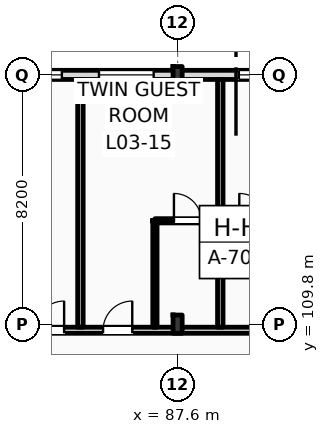
"""IFC4 building model, lengths in metres.
Left out: names, types, materials, properties, quantities, classifications, styles, units other than length and angle.
Written with IfcOpenShell. Run it as: python <this file> out.ifc"""

import sys

from ifc_helpers import new_model, si_unit, direction, frame, frame_2d, origin, origin_2d, place, context, subcontext, project, spatial, rectangle, i_section, extrude, element, fill, save


model = new_model("IFC4")
c1 = context("Model", 3, precision=1e-05, world=origin(), true_north=direction((0.0, 1.0)))
c2 = subcontext(c1, "Body", "Model", "MODEL_VIEW")
j1 = project(units=[si_unit("LENGTHUNIT", "METRE"), si_unit("PLANEANGLEUNIT", "RADIAN")], contexts=[c1])
p1 = place(None, origin())
s1 = spatial("IfcSite", under=j1, at=p1, CompositionType="ELEMENT")
p2 = place(p1, origin())
s2 = spatial("IfcBuilding", under=s1, at=p2, CompositionType="ELEMENT")
p3 = place(p2, frame((0.0, 0.0, 16.2)))
s3 = spatial("IfcBuildingStorey", under=s2, at=p3, CompositionType="ELEMENT", Elevation=16.2)
p4 = place(p3, frame((87.6, 109.8, 0.0), z_axis=(0.0, 0.0, 1.0), x_axis=(1.0, 0.0, 0.0)))
e1 = element("IfcColumn", 1, at=p4, inside=s3, PredefinedType="COLUMN", context=c2, shape_type="SweptSolid", body=[
    extrude(i_section(OverallWidth=0.3, OverallDepth=0.6, WebThickness=0.015, FlangeThickness=0.03, FilletRadius=0.027, at=origin_2d()), origin(), (0.0, 0.0, 1.0), 4.2),
])
p5 = place(p3, frame((87.6, 118.0, 0.0), z_axis=(0.0, 0.0, 1.0), x_axis=(1.0, 0.0, 0.0)))
e2 = element("IfcColumn", 2, at=p5, inside=s3, PredefinedType="COLUMN", context=c2, shape_type="SweptSolid", body=[
    extrude(i_section(OverallWidth=0.3, OverallDepth=0.55, WebThickness=0.015, FlangeThickness=0.029, FilletRadius=0.027, at=origin_2d()), origin(), (0.0, 0.0, 1.0), 4.2),
])
p6 = place(p3, frame((22.5, 118.0, 0.0), z_axis=(0.0, 0.0, 1.0), x_axis=(1.0, 0.0, 0.0)))
e3 = element("IfcWall", 3, at=p6, inside=s3, PredefinedType="STANDARD", context=c2, shape_type="SweptSolid", body=[
    extrude(rectangle(XDim=97.5, YDim=0.3, at=frame_2d((48.75, 0.0))), origin(), (0.0, 0.0, 1.0), 3.36),
])
p7 = place(p6, frame((3.721, 0.0, 0.9)))
e4 = element("IfcOpeningElement", 4, at=p7, cuts=e3, PredefinedType="OPENING", context=c2, shape_type="SweptSolid", body=[
    extrude(rectangle(XDim=0.9, YDim=1.8, at=frame_2d((0.45, 0.9))), frame((0.0, 0.16, 0.0), z_axis=(0.0, -1.0, 0.0), x_axis=(1.0, 0.0, 0.0)), (0.0, 0.0, 1.0), 0.32),
])
p8 = place(p6, frame((6.447, 0.0, 0.9)))
e5 = element("IfcOpeningElement", 5, at=p8, cuts=e3, PredefinedType="OPENING", context=c2, shape_type="SweptSolid", body=[
    extrude(rectangle(XDim=1.35, YDim=1.85, at=frame_2d((0.675, 0.925))), frame((0.0, 0.16, 0.0), z_axis=(0.0, -1.0, 0.0), x_axis=(1.0, 0.0, 0.0)), (0.0, 0.0, 1.0), 0.32),
])
p9 = place(p6, frame((11.363, 0.0, 0.9)))
e6 = element("IfcOpeningElement", 6, at=p9, cuts=e3, PredefinedType="OPENING", context=c2, shape_type="SweptSolid", body=[
    extrude(rectangle(XDim=1.5, YDim=1.9, at=frame_2d((0.75, 0.95))), frame((0.0, 0.16, 0.0), z_axis=(0.0, -1.0, 0.0), x_axis=(1.0, 0.0, 0.0)), (0.0, 0.0, 1.0), 0.32),
])
p10 = place(p6, frame((15.078, 0.0, 0.9)))
e7 = element("IfcOpeningElement", 7, at=p10, cuts=e3, PredefinedType="OPENING", context=c2, shape_type="SweptSolid", body=[
    extrude(rectangle(XDim=1.65, YDim=1.95, at=frame_2d((0.825, 0.975))), frame((0.0, 0.16, 0.0), z_axis=(0.0, -1.0, 0.0), x_axis=(1.0, 0.0, 0.0)), (0.0, 0.0, 1.0), 0.32),
])
p11 = place(p6, frame((19.395, 0.0, 0.9)))
e8 = element("IfcOpeningElement", 8, at=p11, cuts=e3, PredefinedType="OPENING", context=c2, shape_type="SweptSolid", body=[
    extrude(rectangle(XDim=1.8, YDim=2.0, at=frame_2d((0.9, 1.0))), frame((0.0, 0.16, 0.0), z_axis=(0.0, -1.0, 0.0), x_axis=(1.0, 0.0, 0.0)), (0.0, 0.0, 1.0), 0.32),
])
p12 = place(p6, frame((23.31, 0.0, 0.9)))
e9 = element("IfcOpeningElement", 9, at=p12, cuts=e3, PredefinedType="OPENING", context=c2, shape_type="SweptSolid", body=[
    extrude(rectangle(XDim=1.95, YDim=2.05, at=frame_2d((0.975, 1.025))), frame((0.0, 0.16, 0.0), z_axis=(0.0, -1.0, 0.0), x_axis=(1.0, 0.0, 0.0)), (0.0, 0.0, 1.0), 0.32),
])
p13 = place(p6, frame((28.026, 0.0, 0.9)))
e10 = element("IfcOpeningElement", 10, at=p13, cuts=e3, PredefinedType="OPENING", context=c2, shape_type="SweptSolid", body=[
    extrude(rectangle(XDim=2.1, YDim=2.1, at=frame_2d((1.05, 1.05))), frame((0.0, 0.16, 0.0), z_axis=(0.0, -1.0, 0.0), x_axis=(1.0, 0.0, 0.0)), (0.0, 0.0, 1.0), 0.32),
])
p14 = place(p6, frame((31.941, 0.0, 0.9)))
e11 = element("IfcOpeningElement", 11, at=p14, cuts=e3, PredefinedType="OPENING", context=c2, shape_type="SweptSolid", body=[
    extrude(rectangle(XDim=1.1, YDim=2.15, at=frame_2d((0.55, 1.075))), frame((0.0, 0.16, 0.0), z_axis=(0.0, -1.0, 0.0), x_axis=(1.0, 0.0, 0.0)), (0.0, 0.0, 1.0), 0.32),
])
p15 = place(p6, frame((36.657, 0.0, 0.9)))
e12 = element("IfcOpeningElement", 12, at=p15, cuts=e3, PredefinedType="OPENING", context=c2, shape_type="SweptSolid", body=[
    extrude(rectangle(XDim=2.4, YDim=2.2, at=frame_2d((1.2, 1.1))), frame((0.0, 0.16, 0.0), z_axis=(0.0, -1.0, 0.0), x_axis=(1.0, 0.0, 0.0)), (0.0, 0.0, 1.0), 0.32),
])
p16 = place(p6, frame((42.574, 0.0, 0.9)))
e13 = element("IfcOpeningElement", 13, at=p16, cuts=e3, PredefinedType="OPENING", context=c2, shape_type="SweptSolid", body=[
    extrude(rectangle(XDim=1.35, YDim=2.25, at=frame_2d((0.675, 1.125))), frame((0.0, 0.16, 0.0), z_axis=(0.0, -1.0, 0.0), x_axis=(1.0, 0.0, 0.0)), (0.0, 0.0, 1.0), 0.32),
])
p17 = place(p6, frame((45.289, 0.0, 0.9)))
e14 = element("IfcOpeningElement", 14, at=p17, cuts=e3, PredefinedType="OPENING", context=c2, shape_type="SweptSolid", body=[
    extrude(rectangle(XDim=2.7, YDim=2.28, at=frame_2d((1.35, 1.14))), frame((0.0, 0.16, 0.0), z_axis=(0.0, -1.0, 0.0), x_axis=(1.0, 0.0, 0.0)), (0.0, 0.0, 1.0), 0.32),
])
p18 = place(p6, frame((50.406, 0.0, 0.9)))
e15 = element("IfcOpeningElement", 15, at=p18, cuts=e3, PredefinedType="OPENING", context=c2, shape_type="SweptSolid", body=[
    extrude(rectangle(XDim=1.8, YDim=2.28, at=frame_2d((0.9, 1.14))), frame((0.0, 0.16, 0.0), z_axis=(0.0, -1.0, 0.0), x_axis=(1.0, 0.0, 0.0)), (0.0, 0.0, 1.0), 0.32),
])
p19 = place(p6, frame((53.922, 0.0, 0.9)))
e16 = element("IfcOpeningElement", 16, at=p19, cuts=e3, PredefinedType="OPENING", context=c2, shape_type="SweptSolid", body=[
    extrude(rectangle(XDim=1.8, YDim=2.28, at=frame_2d((0.9, 1.14))), frame((0.0, 0.16, 0.0), z_axis=(0.0, -1.0, 0.0), x_axis=(1.0, 0.0, 0.0)), (0.0, 0.0, 1.0), 0.32),
])
p20 = place(p6, frame((58.332, 0.0, 0.9)))
e17 = element("IfcOpeningElement", 17, at=p20, cuts=e3, PredefinedType="OPENING", context=c2, shape_type="SweptSolid", body=[
    extrude(rectangle(XDim=2.961, YDim=2.28, at=frame_2d((1.48, 1.14))), frame((0.0, 0.16, 0.0), z_axis=(0.0, -1.0, 0.0), x_axis=(1.0, 0.0, 0.0)), (0.0, 0.0, 1.0), 0.32),
])
p21 = place(p6, frame((62.513, 0.0, 0.9)))
e18 = element("IfcOpeningElement", 18, at=p21, cuts=e3, PredefinedType="OPENING", context=c2, shape_type="SweptSolid", body=[
    extrude(rectangle(XDim=1.8, YDim=2.28, at=frame_2d((0.9, 1.14))), frame((0.0, 0.16, 0.0), z_axis=(0.0, -1.0, 0.0), x_axis=(1.0, 0.0, 0.0)), (0.0, 0.0, 1.0), 0.32),
])
p22 = place(p6, frame((67.114, 0.0, 0.9)))
e19 = element("IfcOpeningElement", 19, at=p22, cuts=e3, PredefinedType="OPENING", context=c2, shape_type="SweptSolid", body=[
    extrude(rectangle(XDim=2.961, YDim=2.28, at=frame_2d((1.48, 1.14))), frame((0.0, 0.16, 0.0), z_axis=(0.0, -1.0, 0.0), x_axis=(1.0, 0.0, 0.0)), (0.0, 0.0, 1.0), 0.32),
])
p23 = place(p6, frame((73.695, 0.0, 0.9)))
e20 = element("IfcOpeningElement", 20, at=p23, cuts=e3, PredefinedType="OPENING", context=c2, shape_type="SweptSolid", body=[
    extrude(rectangle(XDim=1.1, YDim=2.28, at=frame_2d((0.55, 1.14))), frame((0.0, 0.16, 0.0), z_axis=(0.0, -1.0, 0.0), x_axis=(1.0, 0.0, 0.0)), (0.0, 0.0, 1.0), 0.32),
])
p24 = place(p6, frame((75.895, 0.0, 0.9)))
e21 = element("IfcOpeningElement", 21, at=p24, cuts=e3, PredefinedType="OPENING", context=c2, shape_type="SweptSolid", body=[
    extrude(rectangle(XDim=2.961, YDim=2.28, at=frame_2d((1.48, 1.14))), frame((0.0, 0.16, 0.0), z_axis=(0.0, -1.0, 0.0), x_axis=(1.0, 0.0, 0.0)), (0.0, 0.0, 1.0), 0.32),
])
p25 = place(p6, frame((81.676, 0.0, 0.9)))
e22 = element("IfcOpeningElement", 22, at=p25, cuts=e3, PredefinedType="OPENING", context=c2, shape_type="SweptSolid", body=[
    extrude(rectangle(XDim=1.8, YDim=2.28, at=frame_2d((0.9, 1.14))), frame((0.0, 0.16, 0.0), z_axis=(0.0, -1.0, 0.0), x_axis=(1.0, 0.0, 0.0)), (0.0, 0.0, 1.0), 0.32),
])
p26 = place(p6, frame((84.677, 0.0, 0.9)))
e23 = element("IfcOpeningElement", 23, at=p26, cuts=e3, PredefinedType="OPENING", context=c2, shape_type="SweptSolid", body=[
    extrude(rectangle(XDim=2.961, YDim=2.28, at=frame_2d((1.48, 1.14))), frame((0.0, 0.16, 0.0), z_axis=(0.0, -1.0, 0.0), x_axis=(1.0, 0.0, 0.0)), (0.0, 0.0, 1.0), 0.32),
])
p27 = place(p6, frame((89.999, 0.0, 0.9)))
e24 = element("IfcOpeningElement", 24, at=p27, cuts=e3, PredefinedType="OPENING", context=c2, shape_type="SweptSolid", body=[
    extrude(rectangle(XDim=1.1, YDim=1.5, at=frame_2d((0.55, 0.75))), frame((0.0, 0.16, 0.0), z_axis=(0.0, -1.0, 0.0), x_axis=(1.0, 0.0, 0.0)), (0.0, 0.0, 1.0), 0.32),
])
p28 = place(p6, frame((94.35, 0.0, 0.9)))
e25 = element("IfcOpeningElement", 25, at=p28, cuts=e3, PredefinedType="OPENING", context=c2, shape_type="SweptSolid", body=[
    extrude(rectangle(XDim=1.25, YDim=1.6, at=frame_2d((0.625, 0.8))), frame((0.0, 0.16, 0.0), z_axis=(0.0, -1.0, 0.0), x_axis=(1.0, 0.0, 0.0)), (0.0, 0.0, 1.0), 0.32),
])
p29 = place(p3, frame((10.65, 109.6, 0.0), z_axis=(0.0, 0.0, 1.0), x_axis=(1.0, 0.0, 0.0)))
e26 = element("IfcWall", 26, at=p29, inside=s3, PredefinedType="PARTITIONING", context=c2, shape_type="SweptSolid", body=[
    extrude(rectangle(XDim=109.21, YDim=0.2, at=frame_2d((54.605, 0.0))), origin(), (0.0, 0.0, 1.0), 3.36),
])
p30 = place(p29, frame((15.43, 0.0, 0.0)))
e27 = element("IfcOpeningElement", 27, at=p30, cuts=e26, PredefinedType="OPENING", context=c2, shape_type="SweptSolid", body=[
    extrude(rectangle(XDim=1.02, YDim=2.2, at=frame_2d((0.51, 1.1))), frame((0.0, 0.11, 0.0), z_axis=(0.0, -1.0, 0.0), x_axis=(1.0, 0.0, 0.0)), (0.0, 0.0, 1.0), 0.22),
])
p31 = place(p29, frame((19.537, 0.0, 0.0)))
e28 = element("IfcOpeningElement", 28, at=p31, cuts=e26, PredefinedType="OPENING", context=c2, shape_type="SweptSolid", body=[
    extrude(rectangle(XDim=1.02, YDim=2.2, at=frame_2d((0.51, 1.1))), frame((0.0, 0.11, 0.0), z_axis=(0.0, -1.0, 0.0), x_axis=(1.0, 0.0, 0.0)), (0.0, 0.0, 1.0), 0.22),
])
p32 = place(p29, frame((23.928, 0.0, 0.0)))
e29 = element("IfcOpeningElement", 29, at=p32, cuts=e26, PredefinedType="OPENING", context=c2, shape_type="SweptSolid", body=[
    extrude(rectangle(XDim=1.02, YDim=2.2, at=frame_2d((0.51, 1.1))), frame((0.0, 0.11, 0.0), z_axis=(0.0, -1.0, 0.0), x_axis=(1.0, 0.0, 0.0)), (0.0, 0.0, 1.0), 0.22),
])
p33 = place(p29, frame((26.169, 0.0, 0.0)))
e30 = element("IfcOpeningElement", 30, at=p33, cuts=e26, PredefinedType="OPENING", context=c2, shape_type="SweptSolid", body=[
    extrude(rectangle(XDim=1.02, YDim=2.2, at=frame_2d((0.51, 1.1))), frame((0.0, 0.11, 0.0), z_axis=(0.0, -1.0, 0.0), x_axis=(1.0, 0.0, 0.0)), (0.0, 0.0, 1.0), 0.22),
])
p34 = place(p29, frame((32.739, 0.0, 0.0)))
e31 = element("IfcOpeningElement", 31, at=p34, cuts=e26, PredefinedType="OPENING", context=c2, shape_type="SweptSolid", body=[
    extrude(rectangle(XDim=0.96, YDim=2.2, at=frame_2d((0.48, 1.1))), frame((0.0, 0.11, 0.0), z_axis=(0.0, -1.0, 0.0), x_axis=(1.0, 0.0, 0.0)), (0.0, 0.0, 1.0), 0.22),
])
p35 = place(p29, frame((34.98, 0.0, 0.0)))
e32 = element("IfcOpeningElement", 32, at=p35, cuts=e26, PredefinedType="OPENING", context=c2, shape_type="SweptSolid", body=[
    extrude(rectangle(XDim=0.96, YDim=2.2, at=frame_2d((0.48, 1.1))), frame((0.0, 0.11, 0.0), z_axis=(0.0, -1.0, 0.0), x_axis=(1.0, 0.0, 0.0)), (0.0, 0.0, 1.0), 0.22),
])
p36 = place(p29, frame((41.521, 0.0, 0.0)))
e33 = element("IfcOpeningElement", 33, at=p36, cuts=e26, PredefinedType="OPENING", context=c2, shape_type="SweptSolid", body=[
    extrude(rectangle(XDim=0.96, YDim=2.2, at=frame_2d((0.48, 1.1))), frame((0.0, 0.11, 0.0), z_axis=(0.0, -1.0, 0.0), x_axis=(1.0, 0.0, 0.0)), (0.0, 0.0, 1.0), 0.22),
])
p37 = place(p29, frame((43.512, 0.0, 0.0)))
e34 = element("IfcOpeningElement", 34, at=p37, cuts=e26, PredefinedType="OPENING", context=c2, shape_type="SweptSolid", body=[
    extrude(rectangle(XDim=0.96, YDim=2.2, at=frame_2d((0.48, 1.1))), frame((0.0, 0.11, 0.0), z_axis=(0.0, -1.0, 0.0), x_axis=(1.0, 0.0, 0.0)), (0.0, 0.0, 1.0), 0.22),
])
p38 = place(p29, frame((50.303, 0.0, 0.0)))
e35 = element("IfcOpeningElement", 35, at=p38, cuts=e26, PredefinedType="OPENING", context=c2, shape_type="SweptSolid", body=[
    extrude(rectangle(XDim=0.96, YDim=2.2, at=frame_2d((0.48, 1.1))), frame((0.0, 0.11, 0.0), z_axis=(0.0, -1.0, 0.0), x_axis=(1.0, 0.0, 0.0)), (0.0, 0.0, 1.0), 0.22),
])
p39 = place(p29, frame((54.944, 0.0, 0.0)))
e36 = element("IfcOpeningElement", 36, at=p39, cuts=e26, PredefinedType="OPENING", context=c2, shape_type="SweptSolid", body=[
    extrude(rectangle(XDim=0.96, YDim=2.2, at=frame_2d((0.48, 1.1))), frame((0.0, 0.11, 0.0), z_axis=(0.0, -1.0, 0.0), x_axis=(1.0, 0.0, 0.0)), (0.0, 0.0, 1.0), 0.22),
])
p40 = place(p29, frame((59.085, 0.0, 0.0)))
e37 = element("IfcOpeningElement", 37, at=p40, cuts=e26, PredefinedType="OPENING", context=c2, shape_type="SweptSolid", body=[
    extrude(rectangle(XDim=0.96, YDim=2.2, at=frame_2d((0.48, 1.1))), frame((0.0, 0.11, 0.0), z_axis=(0.0, -1.0, 0.0), x_axis=(1.0, 0.0, 0.0)), (0.0, 0.0, 1.0), 0.22),
])
p41 = place(p29, frame((63.476, 0.0, 0.0)))
e38 = element("IfcOpeningElement", 38, at=p41, cuts=e26, PredefinedType="OPENING", context=c2, shape_type="SweptSolid", body=[
    extrude(rectangle(XDim=0.96, YDim=2.2, at=frame_2d((0.48, 1.1))), frame((0.0, 0.11, 0.0), z_axis=(0.0, -1.0, 0.0), x_axis=(1.0, 0.0, 0.0)), (0.0, 0.0, 1.0), 0.22),
])
p42 = place(p29, frame((65.716, 0.0, 0.0)))
e39 = element("IfcOpeningElement", 39, at=p42, cuts=e26, PredefinedType="OPENING", context=c2, shape_type="SweptSolid", body=[
    extrude(rectangle(XDim=0.96, YDim=2.2, at=frame_2d((0.48, 1.1))), frame((0.0, 0.11, 0.0), z_axis=(0.0, -1.0, 0.0), x_axis=(1.0, 0.0, 0.0)), (0.0, 0.0, 1.0), 0.22),
])
p43 = place(p29, frame((72.257, 0.0, 0.0)))
e40 = element("IfcOpeningElement", 40, at=p43, cuts=e26, PredefinedType="OPENING", context=c2, shape_type="SweptSolid", body=[
    extrude(rectangle(XDim=0.96, YDim=2.2, at=frame_2d((0.48, 1.1))), frame((0.0, 0.11, 0.0), z_axis=(0.0, -1.0, 0.0), x_axis=(1.0, 0.0, 0.0)), (0.0, 0.0, 1.0), 0.22),
])
p44 = place(p29, frame((74.498, 0.0, 0.0)))
e41 = element("IfcOpeningElement", 41, at=p44, cuts=e26, PredefinedType="OPENING", context=c2, shape_type="SweptSolid", body=[
    extrude(rectangle(XDim=0.96, YDim=2.2, at=frame_2d((0.48, 1.1))), frame((0.0, 0.11, 0.0), z_axis=(0.0, -1.0, 0.0), x_axis=(1.0, 0.0, 0.0)), (0.0, 0.0, 1.0), 0.22),
])
p45 = place(p29, frame((81.039, 0.0, 0.0)))
e42 = element("IfcOpeningElement", 42, at=p45, cuts=e26, PredefinedType="OPENING", context=c2, shape_type="SweptSolid", body=[
    extrude(rectangle(XDim=0.96, YDim=2.2, at=frame_2d((0.48, 1.1))), frame((0.0, 0.11, 0.0), z_axis=(0.0, -1.0, 0.0), x_axis=(1.0, 0.0, 0.0)), (0.0, 0.0, 1.0), 0.22),
])
p46 = place(p29, frame((85.68, 0.0, 0.0)))
e43 = element("IfcOpeningElement", 43, at=p46, cuts=e26, PredefinedType="OPENING", context=c2, shape_type="SweptSolid", body=[
    extrude(rectangle(XDim=0.96, YDim=2.2, at=frame_2d((0.48, 1.1))), frame((0.0, 0.11, 0.0), z_axis=(0.0, -1.0, 0.0), x_axis=(1.0, 0.0, 0.0)), (0.0, 0.0, 1.0), 0.22),
])
p47 = place(p29, frame((89.82, 0.0, 0.0)))
e44 = element("IfcOpeningElement", 44, at=p47, cuts=e26, PredefinedType="OPENING", context=c2, shape_type="SweptSolid", body=[
    extrude(rectangle(XDim=0.96, YDim=2.2, at=frame_2d((0.48, 1.1))), frame((0.0, 0.11, 0.0), z_axis=(0.0, -1.0, 0.0), x_axis=(1.0, 0.0, 0.0)), (0.0, 0.0, 1.0), 0.22),
])
p48 = place(p29, frame((94.211, 0.0, 0.0)))
e45 = element("IfcOpeningElement", 45, at=p48, cuts=e26, PredefinedType="OPENING", context=c2, shape_type="SweptSolid", body=[
    extrude(rectangle(XDim=0.96, YDim=2.2, at=frame_2d((0.48, 1.1))), frame((0.0, 0.11, 0.0), z_axis=(0.0, -1.0, 0.0), x_axis=(1.0, 0.0, 0.0)), (0.0, 0.0, 1.0), 0.22),
])
p49 = place(p29, frame((98.602, 0.0, 0.0)))
e46 = element("IfcOpeningElement", 46, at=p49, cuts=e26, PredefinedType="OPENING", context=c2, shape_type="SweptSolid", body=[
    extrude(rectangle(XDim=0.96, YDim=2.2, at=frame_2d((0.48, 1.1))), frame((0.0, 0.11, 0.0), z_axis=(0.0, -1.0, 0.0), x_axis=(1.0, 0.0, 0.0)), (0.0, 0.0, 1.0), 0.22),
])
p50 = place(p29, frame((102.993, 0.0, 0.0)))
e47 = element("IfcOpeningElement", 47, at=p50, cuts=e26, PredefinedType="OPENING", context=c2, shape_type="SweptSolid", body=[
    extrude(rectangle(XDim=0.96, YDim=2.2, at=frame_2d((0.48, 1.1))), frame((0.0, 0.11, 0.0), z_axis=(0.0, -1.0, 0.0), x_axis=(1.0, 0.0, 0.0)), (0.0, 0.0, 1.0), 0.22),
])
p51 = place(p29, frame((105.269, 0.0, 0.0)))
e48 = element("IfcOpeningElement", 48, at=p51, cuts=e26, PredefinedType="OPENING", context=c2, shape_type="SweptSolid", body=[
    extrude(rectangle(XDim=0.96, YDim=2.2, at=frame_2d((0.48, 1.1))), frame((0.0, 0.11, 0.0), z_axis=(0.0, -1.0, 0.0), x_axis=(1.0, 0.0, 0.0)), (0.0, 0.0, 1.0), 0.22),
])
p52 = place(p29, frame((2.716, 0.0, 0.0)))
e49 = element("IfcOpeningElement", 49, at=p52, cuts=e26, PredefinedType="OPENING", context=c2, shape_type="SweptSolid", body=[
    extrude(rectangle(XDim=1.35, YDim=2.25, at=frame_2d((0.675, 1.125))), frame((0.0, 0.11, 0.0), z_axis=(0.0, -1.0, 0.0), x_axis=(1.0, 0.0, 0.0)), (0.0, 0.0, 1.0), 0.22),
])
p53 = place(p29, frame((6.65, 0.0, 0.0)))
e50 = element("IfcOpeningElement", 50, at=p53, cuts=e26, PredefinedType="OPENING", context=c2, shape_type="SweptSolid", body=[
    extrude(rectangle(XDim=1.35, YDim=2.25, at=frame_2d((0.675, 1.125))), frame((0.0, 0.11, 0.0), z_axis=(0.0, -1.0, 0.0), x_axis=(1.0, 0.0, 0.0)), (0.0, 0.0, 1.0), 0.22),
])
p54 = place(p29, frame((10.583, 0.0, 0.0)))
e51 = element("IfcOpeningElement", 51, at=p54, cuts=e26, PredefinedType="OPENING", context=c2, shape_type="SweptSolid", body=[
    extrude(rectangle(XDim=1.35, YDim=2.25, at=frame_2d((0.675, 1.125))), frame((0.0, 0.11, 0.0), z_axis=(0.0, -1.0, 0.0), x_axis=(1.0, 0.0, 0.0)), (0.0, 0.0, 1.0), 0.22),
])
for number, where, z_axis, x_axis in (
    (52, (84.403, 109.7, 0.0), (0.0, 0.0, 1.0), (0.0, 1.0, 0.0)),
    (53, (89.004, 109.7, 0.0), (0.0, 0.0, 1.0), (0.0, 1.0, 0.0)),
):
    element("IfcWall", number, at=place(p3, frame(where, z_axis=z_axis, x_axis=x_axis)), inside=s3, PredefinedType="PARTITIONING", context=c2, shape_type="SweptSolid", body=[
        extrude(rectangle(XDim=8.15, YDim=0.18, at=frame_2d((4.075, 0.0))), origin(), (0.0, 0.0, 1.0), 3.92),
    ])
p55 = place(p3, frame((86.854, 109.7, 0.0), z_axis=(0.0, 0.0, 1.0), x_axis=(0.0, 1.0, 0.0)))
e54 = element("IfcWall", 54, at=p55, inside=s3, PredefinedType="PARTITIONING", context=c2, shape_type="SweptSolid", body=[
    extrude(rectangle(XDim=3.5, YDim=0.14, at=frame_2d((1.75, 0.0))), origin(), (0.0, 0.0, 1.0), 3.92),
])
p56 = place(p3, frame((86.854, 113.2, 0.0), z_axis=(0.0, 0.0, 1.0), x_axis=(1.0, 0.0, 0.0)))
e55 = element("IfcWall", 55, at=p56, inside=s3, PredefinedType="PARTITIONING", context=c2, shape_type="SweptSolid", body=[
    extrude(rectangle(XDim=2.15, YDim=0.14, at=frame_2d((1.075, 0.0))), origin(), (0.0, 0.0, 1.0), 3.92),
])
p57 = place(p56, frame((0.625, 0.0, 0.0)))
e56 = element("IfcOpeningElement", 56, at=p57, cuts=e55, PredefinedType="OPENING", context=c2, shape_type="SweptSolid", body=[
    extrude(rectangle(XDim=0.9, YDim=2.1, at=frame_2d((0.45, 1.05))), frame((0.0, 0.08, 0.0), z_axis=(0.0, -1.0, 0.0), x_axis=(1.0, 0.0, 0.0)), (0.0, 0.0, 1.0), 0.16),
])
p58 = place(p3, frame((89.004, 113.2, 0.0), z_axis=(0.0, 0.0, 1.0), x_axis=(1.0, 0.0, 0.0)))
e57 = element("IfcWall", 57, at=p58, inside=s3, PredefinedType="PARTITIONING", context=c2, shape_type="SweptSolid", body=[
    extrude(rectangle(XDim=2.15, YDim=0.14, at=frame_2d((1.075, 0.0))), origin(), (0.0, 0.0, 1.0), 3.92),
])
p59 = place(p58, frame((0.625, 0.0, 0.0)))
e58 = element("IfcOpeningElement", 58, at=p59, cuts=e57, PredefinedType="OPENING", context=c2, shape_type="SweptSolid", body=[
    extrude(rectangle(XDim=0.9, YDim=2.1, at=frame_2d((0.45, 1.05))), frame((0.0, 0.08, 0.0), z_axis=(0.0, -1.0, 0.0), x_axis=(1.0, 0.0, 0.0)), (0.0, 0.0, 1.0), 0.16),
])
p60 = place(p20, origin())
e59 = element("IfcWindow", 59, at=p60, inside=s3, PartitioningType="DOUBLE_PANEL_VERTICAL", PredefinedType="WINDOW", context=c2, shape_type="SweptSolid", body=[
    extrude(rectangle(XDim=2.961, YDim=2.28, at=frame_2d((1.48, 1.14))), frame((0.0, 0.03, 0.0), z_axis=(0.0, -1.0, 0.0), x_axis=(1.0, 0.0, 0.0)), (0.0, 0.0, 1.0), 0.06),
])
fill(e17, e59)
p61 = place(p21, origin())
e60 = element("IfcWindow", 60, at=p61, inside=s3, PartitioningType="DOUBLE_PANEL_VERTICAL", PredefinedType="WINDOW", context=c2, shape_type="SweptSolid", body=[
    extrude(rectangle(XDim=1.8, YDim=2.28, at=frame_2d((0.9, 1.14))), frame((0.0, 0.03, 0.0), z_axis=(0.0, -1.0, 0.0), x_axis=(1.0, 0.0, 0.0)), (0.0, 0.0, 1.0), 0.06),
])
fill(e18, e60)
p62 = place(p22, origin())
e61 = element("IfcWindow", 61, at=p62, inside=s3, PartitioningType="DOUBLE_PANEL_VERTICAL", PredefinedType="WINDOW", context=c2, shape_type="SweptSolid", body=[
    extrude(rectangle(XDim=2.961, YDim=2.28, at=frame_2d((1.48, 1.14))), frame((0.0, 0.03, 0.0), z_axis=(0.0, -1.0, 0.0), x_axis=(1.0, 0.0, 0.0)), (0.0, 0.0, 1.0), 0.06),
])
fill(e19, e61)
p63 = place(p43, origin())
e62 = element("IfcDoor", 62, at=p63, inside=s3, OperationType="SINGLE_SWING_RIGHT", PredefinedType="DOOR", context=c2, shape_type="SweptSolid", body=[
    extrude(rectangle(XDim=0.96, YDim=2.2, at=frame_2d((0.48, 1.1))), frame((0.0, 0.025, 0.0), z_axis=(0.0, -1.0, 0.0), x_axis=(1.0, 0.0, 0.0)), (0.0, 0.0, 1.0), 0.05),
])
fill(e40, e62)
p64 = place(p44, origin())
e63 = element("IfcDoor", 63, at=p64, inside=s3, OperationType="SINGLE_SWING_RIGHT", PredefinedType="DOOR", context=c2, shape_type="SweptSolid", body=[
    extrude(rectangle(XDim=0.96, YDim=2.2, at=frame_2d((0.48, 1.1))), frame((0.0, 0.025, 0.0), z_axis=(0.0, -1.0, 0.0), x_axis=(1.0, 0.0, 0.0)), (0.0, 0.0, 1.0), 0.05),
])
fill(e41, e63)
p65 = place(p57, origin())
e64 = element("IfcDoor", 64, at=p65, inside=s3, OperationType="SINGLE_SWING_LEFT", PredefinedType="DOOR", context=c2, shape_type="SweptSolid", body=[
    extrude(rectangle(XDim=0.9, YDim=2.1, at=frame_2d((0.45, 1.05))), frame((0.0, 0.025, 0.0), z_axis=(0.0, -1.0, 0.0), x_axis=(1.0, 0.0, 0.0)), (0.0, 0.0, 1.0), 0.05),
])
fill(e56, e64)
p66 = place(p59, origin())
e65 = element("IfcDoor", 65, at=p66, inside=s3, OperationType="SINGLE_SWING_LEFT", PredefinedType="DOOR", context=c2, shape_type="SweptSolid", body=[
    extrude(rectangle(XDim=0.9, YDim=2.1, at=frame_2d((0.45, 1.05))), frame((0.0, 0.025, 0.0), z_axis=(0.0, -1.0, 0.0), x_axis=(1.0, 0.0, 0.0)), (0.0, 0.0, 1.0), 0.05),
])
fill(e58, e65)
save(model, sys.argv[1])
